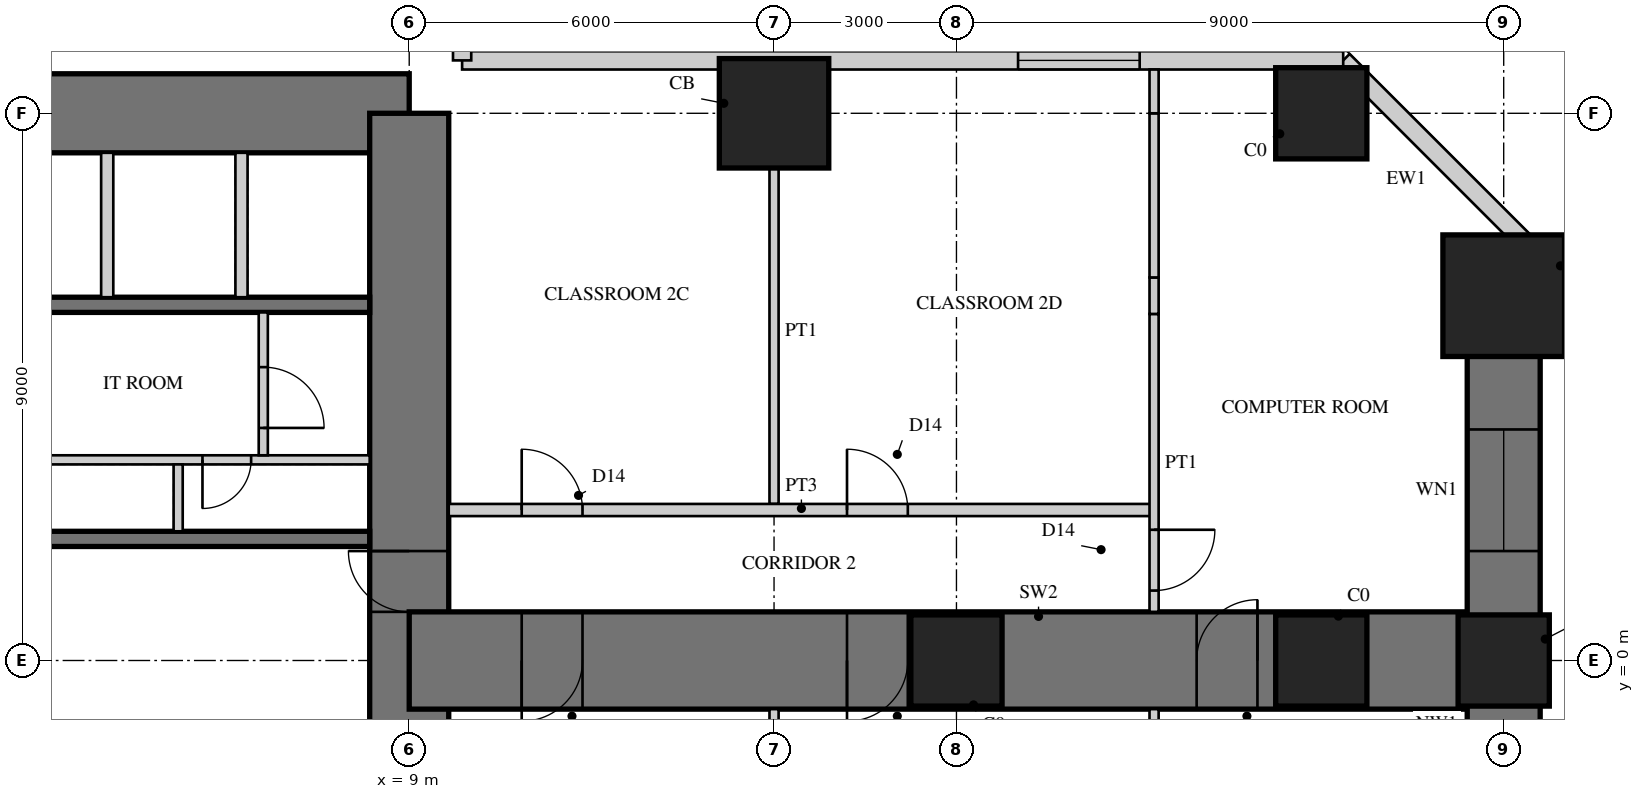
"""IFC4 building model, lengths in metres.
Left out: names, types, materials, properties, quantities, classifications, styles, units other than length and angle.
Written with IfcOpenShell. Run it as: python <this file> out.ifc"""

import sys

from ifc_helpers import new_model, si_unit, direction, frame, frame_2d, origin, origin_2d, place, context, subcontext, project, spatial, rectangle, hollow_rectangle, extrude, element, fill, save


model = new_model("IFC4")
c1 = context("Model", 3, precision=1e-05, world=origin(), true_north=direction((0.0, 1.0)))
c2 = subcontext(c1, "Body", "Model", "MODEL_VIEW")
j1 = project(units=[si_unit("LENGTHUNIT", "METRE"), si_unit("PLANEANGLEUNIT", "RADIAN")], contexts=[c1])
p1 = place(None, origin())
s1 = spatial("IfcSite", under=j1, at=p1, CompositionType="ELEMENT")
p2 = place(p1, origin())
s2 = spatial("IfcBuilding", under=s1, at=p2, CompositionType="ELEMENT")
p3 = place(p2, frame((0.0, 0.0, 9.5)))
s3 = spatial("IfcBuildingStorey", under=s2, at=p3, CompositionType="ELEMENT", Elevation=9.5)
p4 = place(p3, frame((9.0, 9.0, 0.0), z_axis=(0.0, 0.0, 1.0), x_axis=(-1.0, 0.0, 0.0)))
e1 = element("IfcWall", 1, at=p4, inside=s3, PredefinedType="SHEAR", context=c2, shape_type="SweptSolid", body=[
    extrude(rectangle(XDim=18.0, YDim=1.3, at=frame_2d((9.0, 0.0))), origin(), (0.0, 0.0, 1.0), 4.5),
])
p5 = place(p4, frame((9.8, 0.0, 0.0)))
e2 = element("IfcOpeningElement", 2, at=p5, cuts=e1, PredefinedType="OPENING", context=c2, shape_type="SweptSolid", body=[
    extrude(rectangle(XDim=1.0, YDim=2.4, at=frame_2d((0.5, 1.2))), frame((0.0, 0.66, 0.0), z_axis=(0.0, -1.0, 0.0), x_axis=(1.0, 0.0, 0.0)), (0.0, 0.0, 1.0), 1.32),
])
p6 = place(p3, frame((9.0, -9.0, 0.0), z_axis=(0.0, 0.0, 1.0), x_axis=(0.0, 1.0, 0.0)))
e3 = element("IfcWall", 3, at=p6, inside=s3, PredefinedType="SHEAR", context=c2, shape_type="SweptSolid", body=[
    extrude(rectangle(XDim=18.0, YDim=1.3, at=frame_2d((9.0, 0.0))), origin(), (0.0, 0.0, 1.0), 4.5),
])
p7 = place(p6, frame((9.8, 0.0, 0.0)))
e4 = element("IfcOpeningElement", 4, at=p7, cuts=e3, PredefinedType="OPENING", context=c2, shape_type="SweptSolid", body=[
    extrude(rectangle(XDim=1.0, YDim=2.4, at=frame_2d((0.5, 1.2))), frame((0.0, 0.66, 0.0), z_axis=(0.0, -1.0, 0.0), x_axis=(1.0, 0.0, 0.0)), (0.0, 0.0, 1.0), 1.32),
])
for number, where, z_axis, x_axis in (
    (5, (1.925, 2.0, 0.0), (0.0, 0.0, 1.0), (1.0, 0.0, 0.0)),
    (6, (1.925, 5.85, 0.0), (0.0, 0.0, 1.0), (1.0, 0.0, 0.0)),
):
    element("IfcWall", number, at=place(p3, frame(where, z_axis=z_axis, x_axis=x_axis)), inside=s3, PredefinedType="SHEAR", context=c2, shape_type="SweptSolid", body=[
        extrude(rectangle(XDim=6.425, YDim=0.25, at=frame_2d((3.212, 0.0))), origin(), (0.0, 0.0, 1.0), 4.5),
    ])
p8 = place(p3, frame((1.925, 3.3, 0.0), z_axis=(0.0, 0.0, 1.0), x_axis=(1.0, 0.0, 0.0)))
e7 = element("IfcWall", 7, at=p8, inside=s3, PredefinedType="PARTITIONING", context=c2, shape_type="SweptSolid", body=[
    extrude(rectangle(XDim=6.425, YDim=0.15, at=frame_2d((3.212, 0.0))), origin(), (0.0, 0.0, 1.0), 4.5),
])
p9 = place(p8, frame((0.075, 0.0, 0.0)))
e8 = element("IfcOpeningElement", 8, at=p9, cuts=e7, PredefinedType="OPENING", context=c2, shape_type="SweptSolid", body=[
    extrude(rectangle(XDim=0.8, YDim=2.1, at=frame_2d((0.4, 1.05))), frame((0.0, 0.085, 0.0), z_axis=(0.0, -1.0, 0.0), x_axis=(1.0, 0.0, 0.0)), (0.0, 0.0, 1.0), 0.17),
])
p10 = place(p8, frame((3.675, 0.0, 0.0)))
e9 = element("IfcOpeningElement", 9, at=p10, cuts=e7, PredefinedType="OPENING", context=c2, shape_type="SweptSolid", body=[
    extrude(rectangle(XDim=0.8, YDim=2.1, at=frame_2d((0.4, 1.05))), frame((0.0, 0.085, 0.0), z_axis=(0.0, -1.0, 0.0), x_axis=(1.0, 0.0, 0.0)), (0.0, 0.0, 1.0), 0.17),
])
p11 = place(p3, frame((5.2, 2.125, 0.0), z_axis=(0.0, 0.0, 1.0), x_axis=(0.0, 1.0, 0.0)))
e10 = element("IfcWall", 10, at=p11, inside=s3, PredefinedType="PARTITIONING", context=c2, shape_type="SweptSolid", body=[
    extrude(rectangle(XDim=1.1, YDim=0.15, at=frame_2d((0.55, 0.0))), origin(), (0.0, 0.0, 1.0), 4.5),
])
for number, where, z_axis, x_axis in (
    (11, (4.033, 5.975, 0.0), (0.0, 0.0, 1.0), (0.0, 1.0, 0.0)),
    (12, (6.242, 5.975, 0.0), (0.0, 0.0, 1.0), (0.0, 1.0, 0.0)),
):
    element("IfcWall", number, at=place(p3, frame(where, z_axis=z_axis, x_axis=x_axis)), inside=s3, PredefinedType="PARTITIONING", context=c2, shape_type="SweptSolid", body=[
        extrude(rectangle(XDim=2.375, YDim=0.2, at=frame_2d((1.188, 0.0))), origin(), (0.0, 0.0, 1.0), 4.5),
    ])
p12 = place(p3, frame((9.0, 0.0, 0.0), z_axis=(0.0, 0.0, 1.0), x_axis=(1.0, 0.0, 0.0)))
e13 = element("IfcWall", 13, at=p12, inside=s3, PredefinedType="SHEAR", context=c2, shape_type="SweptSolid", body=[
    extrude(rectangle(XDim=18.0, YDim=1.6, at=frame_2d((9.0, 0.0))), origin(), (0.0, 0.0, 1.0), 4.5),
])
p13 = place(p12, frame((1.85, 0.0, 0.0)))
e14 = element("IfcOpeningElement", 14, at=p13, cuts=e13, PredefinedType="OPENING", context=c2, shape_type="SweptSolid", body=[
    extrude(rectangle(XDim=1.0, YDim=2.2, at=frame_2d((0.5, 1.1))), frame((0.0, 0.81, 0.0), z_axis=(0.0, -1.0, 0.0), x_axis=(1.0, 0.0, 0.0)), (0.0, 0.0, 1.0), 1.62),
])
p14 = place(p12, frame((7.2, 0.0, 0.0)))
e15 = element("IfcOpeningElement", 15, at=p14, cuts=e13, PredefinedType="OPENING", context=c2, shape_type="SweptSolid", body=[
    extrude(rectangle(XDim=1.0, YDim=2.2, at=frame_2d((0.5, 1.1))), frame((0.0, 0.81, 0.0), z_axis=(0.0, -1.0, 0.0), x_axis=(1.0, 0.0, 0.0)), (0.0, 0.0, 1.0), 1.62),
])
p15 = place(p12, frame((12.95, 0.0, 0.0)))
e16 = element("IfcOpeningElement", 16, at=p15, cuts=e13, PredefinedType="OPENING", context=c2, shape_type="SweptSolid", body=[
    extrude(rectangle(XDim=1.0, YDim=2.2, at=frame_2d((0.5, 1.1))), frame((0.0, 0.81, 0.0), z_axis=(0.0, -1.0, 0.0), x_axis=(1.0, 0.0, 0.0)), (0.0, 0.0, 1.0), 1.62),
])
p16 = place(p3, frame((27.0, -6.0, 0.0), z_axis=(0.0, 0.0, 1.0), x_axis=(0.0, 1.0, 0.0)))
e17 = element("IfcWall", 17, at=p16, inside=s3, PredefinedType="SHEAR", context=c2, shape_type="SweptSolid", body=[
    extrude(rectangle(XDim=12.0, YDim=1.2, at=frame_2d((6.0, 0.0))), origin(), (0.0, 0.0, 1.0), 4.5),
])
p17 = place(p16, frame((2.2, 0.0, 0.9)))
e18 = element("IfcOpeningElement", 18, at=p17, cuts=e17, PredefinedType="OPENING", context=c2, shape_type="SweptSolid", body=[
    extrude(rectangle(XDim=2.0, YDim=1.8, at=frame_2d((1.0, 0.9))), frame((0.0, 0.61, 0.0), z_axis=(0.0, -1.0, 0.0), x_axis=(1.0, 0.0, 0.0)), (0.0, 0.0, 1.0), 1.22),
])
p18 = place(p16, frame((7.8, 0.0, 0.9)))
e19 = element("IfcOpeningElement", 19, at=p18, cuts=e17, PredefinedType="OPENING", context=c2, shape_type="SweptSolid", body=[
    extrude(rectangle(XDim=2.0, YDim=1.8, at=frame_2d((1.0, 0.9))), frame((0.0, 0.61, 0.0), z_axis=(0.0, -1.0, 0.0), x_axis=(1.0, 0.0, 0.0)), (0.0, 0.0, 1.0), 1.22),
])
p19 = place(p3, frame((15.0, 9.0, 0.0), z_axis=(0.0, 0.0, 1.0), x_axis=(1.0, 0.0, 0.0)))
e20 = element("IfcColumn", 20, at=p19, inside=s3, PredefinedType="COLUMN", context=c2, shape_type="SweptSolid", body=[
    extrude(rectangle(XDim=1.8, YDim=1.8, at=origin_2d()), origin(), (0.0, 0.0, 1.0), 4.5),
])
for number, where, z_axis, x_axis in (
    (21, (24.0, 9.0, 0.0), (0.0, 0.0, 1.0), (1.0, 0.0, 0.0)),
    (22, (27.0, 0.0, 0.0), (0.0, 0.0, 1.0), (1.0, 0.0, 0.0)),
):
    element("IfcColumn", number, at=place(p3, frame(where, z_axis=z_axis, x_axis=x_axis)), inside=s3, PredefinedType="COLUMN", context=c2, shape_type="SweptSolid", body=[
        extrude(rectangle(XDim=1.5, YDim=1.5, at=origin_2d()), origin(), (0.0, 0.0, 1.0), 4.5),
    ])
p20 = place(p3, frame((27.0, 6.0, 0.0), z_axis=(0.0, 0.0, 1.0), x_axis=(1.0, 0.0, 0.0)))
e23 = element("IfcColumn", 23, at=p20, inside=s3, PredefinedType="COLUMN", context=c2, shape_type="SweptSolid", body=[
    extrude(rectangle(XDim=2.0, YDim=2.0, at=origin_2d()), origin(), (0.0, 0.0, 1.0), 4.5),
])
for number, where, z_axis, x_axis in (
    (24, (18.0, 0.0, 0.0), (0.0, 0.0, 1.0), (1.0, 0.0, 0.0)),
    (25, (24.0, 0.0, 0.0), (0.0, 0.0, 1.0), (1.0, 0.0, 0.0)),
):
    element("IfcColumn", number, at=place(p3, frame(where, z_axis=z_axis, x_axis=x_axis)), inside=s3, PredefinedType="COLUMN", context=c2, shape_type="SweptSolid", body=[
        extrude(rectangle(XDim=1.5, YDim=1.5, at=origin_2d()), origin(), (0.0, 0.0, 1.0), 4.5),
    ])
p21 = place(p3, frame((27.6, 6.63, 0.0), z_axis=(0.0, 0.0, 1.0), x_axis=(-0.707106781187, 0.707106781187, 0.0)))
e26 = element("IfcWall", 26, at=p21, inside=s3, PredefinedType="SOLIDWALL", context=c2, shape_type="SweptSolid", body=[
    extrude(rectangle(XDim=4.582, YDim=0.3, at=frame_2d((2.291, 0.0))), origin(), (0.0, 0.0, 1.0), 4.3),
])
p22 = place(p3, frame((24.36, 9.87, 0.0), z_axis=(0.0, 0.0, 1.0), x_axis=(-1.0, 0.0, 0.0)))
e27 = element("IfcWall", 27, at=p22, inside=s3, PredefinedType="SOLIDWALL", context=c2, shape_type="SweptSolid", body=[
    extrude(rectangle(XDim=14.49, YDim=0.3, at=frame_2d((7.245, 0.0))), origin(), (0.0, 0.0, 1.0), 4.3),
])
p23 = place(p22, frame((3.347, 0.0, 0.9)))
e28 = element("IfcOpeningElement", 28, at=p23, cuts=e27, PredefinedType="OPENING", context=c2, shape_type="SweptSolid", body=[
    extrude(rectangle(XDim=2.0, YDim=1.8, at=frame_2d((1.0, 0.9))), frame((0.0, 0.16, 0.0), z_axis=(0.0, -1.0, 0.0), x_axis=(1.0, 0.0, 0.0)), (0.0, 0.0, 1.0), 0.32),
])
p24 = place(p3, frame((9.87, 9.87, 0.0), z_axis=(0.0, 0.0, 1.0), x_axis=(0.0, 1.0, 0.0)))
e29 = element("IfcWall", 29, at=p24, inside=s3, PredefinedType="SOLIDWALL", context=c2, shape_type="SweptSolid", body=[
    extrude(rectangle(XDim=14.49, YDim=0.3, at=frame_2d((7.245, 0.0))), origin(), (0.0, 0.0, 1.0), 4.3),
])
p25 = place(p24, frame((6.245, 0.0, 0.9)))
e30 = element("IfcOpeningElement", 30, at=p25, cuts=e29, PredefinedType="OPENING", context=c2, shape_type="SweptSolid", body=[
    extrude(rectangle(XDim=2.0, YDim=1.8, at=frame_2d((1.0, 0.9))), frame((0.0, 0.16, 0.0), z_axis=(0.0, -1.0, 0.0), x_axis=(1.0, 0.0, 0.0)), (0.0, 0.0, 1.0), 0.32),
])
p26 = place(p24, frame((9.143, 0.0, 0.9)))
e31 = element("IfcOpeningElement", 31, at=p26, cuts=e29, PredefinedType="OPENING", context=c2, shape_type="SweptSolid", body=[
    extrude(rectangle(XDim=2.0, YDim=1.8, at=frame_2d((1.0, 0.9))), frame((0.0, 0.16, 0.0), z_axis=(0.0, -1.0, 0.0), x_axis=(1.0, 0.0, 0.0)), (0.0, 0.0, 1.0), 0.32),
])
p27 = place(p3, frame((6.6, 3.375, 0.0), z_axis=(0.0, 0.0, 1.0), x_axis=(0.0, 1.0, 0.0)))
e32 = element("IfcWall", 32, at=p27, inside=s3, PredefinedType="PARTITIONING", context=c2, shape_type="SweptSolid", body=[
    extrude(rectangle(XDim=2.35, YDim=0.15, at=frame_2d((1.175, 0.0))), origin(), (0.0, 0.0, 1.0), 4.3),
])
p28 = place(p27, frame((0.45, 0.0, 0.0)))
e33 = element("IfcOpeningElement", 33, at=p28, cuts=e32, PredefinedType="OPENING", context=c2, shape_type="SweptSolid", body=[
    extrude(rectangle(XDim=1.0, YDim=2.1, at=frame_2d((0.5, 1.05))), frame((0.0, 0.085, 0.0), z_axis=(0.0, -1.0, 0.0), x_axis=(1.0, 0.0, 0.0)), (0.0, 0.0, 1.0), 0.17),
])
p29 = place(p3, frame((15.0, 2.575, 0.0), z_axis=(0.0, 0.0, 1.0), x_axis=(0.0, 1.0, 0.0)))
e34 = element("IfcWall", 34, at=p29, inside=s3, PredefinedType="PARTITIONING", context=c2, shape_type="SweptSolid", body=[
    extrude(rectangle(XDim=5.675, YDim=0.15, at=frame_2d((2.837, 0.0))), origin(), (0.0, 0.0, 1.0), 3.35),
])
p30 = place(p3, frame((15.0, -8.25, 0.0), z_axis=(0.0, 0.0, 1.0), x_axis=(0.0, 1.0, 0.0)))
e35 = element("IfcWall", 35, at=p30, inside=s3, PredefinedType="PARTITIONING", context=c2, shape_type="SweptSolid", body=[
    extrude(rectangle(XDim=7.45, YDim=0.15, at=frame_2d((3.725, 0.0))), origin(), (0.0, 0.0, 1.0), 3.35),
])
p31 = place(p3, frame((9.65, 2.475, 0.0), z_axis=(0.0, 0.0, 1.0), x_axis=(1.0, 0.0, 0.0)))
e36 = element("IfcWall", 36, at=p31, inside=s3, PredefinedType="SOLIDWALL", context=c2, shape_type="SweptSolid", body=[
    extrude(rectangle(XDim=11.6, YDim=0.2, at=frame_2d((5.8, 0.0))), origin(), (0.0, 0.0, 1.0), 4.3),
])
p32 = place(p31, frame((1.2, 0.0, 0.0)))
e37 = element("IfcOpeningElement", 37, at=p32, cuts=e36, PredefinedType="OPENING", context=c2, shape_type="SweptSolid", body=[
    extrude(rectangle(XDim=1.0, YDim=2.2, at=frame_2d((0.5, 1.1))), frame((0.0, 0.11, 0.0), z_axis=(0.0, -1.0, 0.0), x_axis=(1.0, 0.0, 0.0)), (0.0, 0.0, 1.0), 0.22),
])
p33 = place(p31, frame((6.55, 0.0, 0.0)))
e38 = element("IfcOpeningElement", 38, at=p33, cuts=e36, PredefinedType="OPENING", context=c2, shape_type="SweptSolid", body=[
    extrude(rectangle(XDim=1.0, YDim=2.2, at=frame_2d((0.5, 1.1))), frame((0.0, 0.11, 0.0), z_axis=(0.0, -1.0, 0.0), x_axis=(1.0, 0.0, 0.0)), (0.0, 0.0, 1.0), 0.22),
])
p34 = place(p3, frame((21.25, -5.7, 0.0), z_axis=(0.0, 0.0, 1.0), x_axis=(0.0, 1.0, 0.0)))
e39 = element("IfcWall", 39, at=p34, inside=s3, PredefinedType="PARTITIONING", context=c2, shape_type="SweptSolid", body=[
    extrude(rectangle(XDim=4.9, YDim=0.15, at=frame_2d((2.45, 0.0))), origin(), (0.0, 0.0, 1.0), 3.35),
])
p35 = place(p3, frame((21.25, 0.8, 0.0), z_axis=(0.0, 0.0, 1.0), x_axis=(0.0, 1.0, 0.0)))
e40 = element("IfcWall", 40, at=p35, inside=s3, PredefinedType="PARTITIONING", context=c2, shape_type="SweptSolid", body=[
    extrude(rectangle(XDim=4.9, YDim=0.15, at=frame_2d((2.45, 0.0))), origin(), (0.0, 0.0, 1.0), 3.35),
])
p36 = place(p35, frame((0.35, 0.0, 0.0)))
e41 = element("IfcOpeningElement", 41, at=p36, cuts=e40, PredefinedType="OPENING", context=c2, shape_type="SweptSolid", body=[
    extrude(rectangle(XDim=1.0, YDim=2.2, at=frame_2d((0.5, 1.1))), frame((0.0, 0.085, 0.0), z_axis=(0.0, -1.0, 0.0), x_axis=(1.0, 0.0, 0.0)), (0.0, 0.0, 1.0), 0.17),
])
p37 = place(p3, frame((21.25, 5.7, 0.0), z_axis=(0.0, 0.0, 1.0), x_axis=(0.0, 1.0, 0.0)))
e42 = element("IfcWall", 42, at=p37, inside=s3, PredefinedType="PARTITIONING", context=c2, shape_type="SweptSolid", body=[
    extrude(rectangle(XDim=0.6, YDim=0.15, at=frame_2d((0.3, 0.0))), origin(), (0.0, 0.0, 1.0), 4.3),
])
p38 = place(p3, frame((21.25, 6.3, 0.0), z_axis=(0.0, 0.0, 1.0), x_axis=(0.0, 1.0, 0.0)))
e43 = element("IfcWall", 43, at=p38, inside=s3, PredefinedType="PARTITIONING", context=c2, shape_type="SweptSolid", body=[
    extrude(rectangle(XDim=2.7, YDim=0.15, at=frame_2d((1.35, 0.0))), origin(), (0.0, 0.0, 1.0), 3.35),
])
p39 = place(p3, frame((21.25, 9.0, 0.0), z_axis=(0.0, 0.0, 1.0), x_axis=(0.0, 1.0, 0.0)))
e44 = element("IfcWall", 44, at=p39, inside=s3, PredefinedType="PARTITIONING", context=c2, shape_type="SweptSolid", body=[
    extrude(rectangle(XDim=0.72, YDim=0.15, at=frame_2d((0.36, 0.0))), origin(), (0.0, 0.0, 1.0), 4.3),
])
p40 = place(p18, origin())
e45 = element("IfcWindow", 45, at=p40, inside=s3, PartitioningType="SINGLE_PANEL", PredefinedType="WINDOW", context=c2, shape_type="SweptSolid", body=[
    extrude(hollow_rectangle(XDim=2.0, YDim=1.8, WallThickness=0.06, at=frame_2d((1.0, 0.9))), frame((0.0, 0.03, 0.0), z_axis=(0.0, -1.0, 0.0), x_axis=(1.0, 0.0, 0.0)), (0.0, 0.0, 1.0), 0.06),
    extrude(rectangle(XDim=1.879, YDim=1.679, at=frame_2d((1.0, 0.9))), frame((0.0, 0.03, 0.0), z_axis=(0.0, -1.0, 0.0), x_axis=(1.0, 0.0, 0.0)), (0.0, 0.0, 1.0), 0.06),
])
fill(e19, e45)
p41 = place(p23, origin())
e46 = element("IfcWindow", 46, at=p41, inside=s3, PartitioningType="SINGLE_PANEL", PredefinedType="WINDOW", context=c2, shape_type="SweptSolid", body=[
    extrude(hollow_rectangle(XDim=2.0, YDim=1.8, WallThickness=0.06, at=frame_2d((1.0, 0.9))), frame((0.0, 0.03, 0.0), z_axis=(0.0, -1.0, 0.0), x_axis=(1.0, 0.0, 0.0)), (0.0, 0.0, 1.0), 0.06),
    extrude(rectangle(XDim=1.879, YDim=1.679, at=frame_2d((1.0, 0.9))), frame((0.0, 0.03, 0.0), z_axis=(0.0, -1.0, 0.0), x_axis=(1.0, 0.0, 0.0)), (0.0, 0.0, 1.0), 0.06),
])
fill(e28, e46)
p42 = place(p28, frame((1.0, 0.0, 0.0), z_axis=(0.0, 0.0, 1.0), x_axis=(-1.0, 0.0, 0.0)))
e47 = element("IfcDoor", 47, at=p42, inside=s3, OperationType="SINGLE_SWING_RIGHT", PredefinedType="DOOR", context=c2, shape_type="SweptSolid", body=[
    extrude(rectangle(XDim=1.0, YDim=2.1, at=frame_2d((0.5, 1.05))), frame((0.0, 0.025, 0.0), z_axis=(0.0, -1.0, 0.0), x_axis=(1.0, 0.0, 0.0)), (0.0, 0.0, 1.0), 0.05),
])
fill(e33, e47)
p43 = place(p32, origin())
e48 = element("IfcDoor", 48, at=p43, inside=s3, OperationType="SINGLE_SWING_LEFT", PredefinedType="DOOR", context=c2, shape_type="SweptSolid", body=[
    extrude(rectangle(XDim=1.0, YDim=2.2, at=frame_2d((0.5, 1.1))), frame((0.0, 0.025, 0.0), z_axis=(0.0, -1.0, 0.0), x_axis=(1.0, 0.0, 0.0)), (0.0, 0.0, 1.0), 0.05),
])
fill(e37, e48)
p44 = place(p33, origin())
e49 = element("IfcDoor", 49, at=p44, inside=s3, OperationType="SINGLE_SWING_LEFT", PredefinedType="DOOR", context=c2, shape_type="SweptSolid", body=[
    extrude(rectangle(XDim=1.0, YDim=2.2, at=frame_2d((0.5, 1.1))), frame((0.0, 0.025, 0.0), z_axis=(0.0, -1.0, 0.0), x_axis=(1.0, 0.0, 0.0)), (0.0, 0.0, 1.0), 0.05),
])
fill(e38, e49)
p45 = place(p36, frame((1.0, 0.0, 0.0), z_axis=(0.0, 0.0, 1.0), x_axis=(-1.0, 0.0, 0.0)))
e50 = element("IfcDoor", 50, at=p45, inside=s3, OperationType="SINGLE_SWING_LEFT", PredefinedType="DOOR", context=c2, shape_type="SweptSolid", body=[
    extrude(rectangle(XDim=1.0, YDim=2.2, at=frame_2d((0.5, 1.1))), frame((0.0, 0.025, 0.0), z_axis=(0.0, -1.0, 0.0), x_axis=(1.0, 0.0, 0.0)), (0.0, 0.0, 1.0), 0.05),
])
fill(e41, e50)
p46 = place(p13, frame((1.0, 0.0, 0.0), z_axis=(0.0, 0.0, 1.0), x_axis=(-1.0, 0.0, 0.0)))
e51 = element("IfcDoor", 51, at=p46, inside=s3, OperationType="SINGLE_SWING_RIGHT", PredefinedType="DOOR", context=c2, shape_type="SweptSolid", body=[
    extrude(rectangle(XDim=1.0, YDim=2.2, at=frame_2d((0.5, 1.1))), frame((0.0, 0.025, 0.0), z_axis=(0.0, -1.0, 0.0), x_axis=(1.0, 0.0, 0.0)), (0.0, 0.0, 1.0), 0.05),
])
fill(e14, e51)
p47 = place(p14, frame((1.0, 0.0, 0.0), z_axis=(0.0, 0.0, 1.0), x_axis=(-1.0, 0.0, 0.0)))
e52 = element("IfcDoor", 52, at=p47, inside=s3, OperationType="SINGLE_SWING_RIGHT", PredefinedType="DOOR", context=c2, shape_type="SweptSolid", body=[
    extrude(rectangle(XDim=1.0, YDim=2.2, at=frame_2d((0.5, 1.1))), frame((0.0, 0.025, 0.0), z_axis=(0.0, -1.0, 0.0), x_axis=(1.0, 0.0, 0.0)), (0.0, 0.0, 1.0), 0.05),
])
fill(e15, e52)
p48 = place(p15, origin())
e53 = element("IfcDoor", 53, at=p48, inside=s3, OperationType="SINGLE_SWING_RIGHT", PredefinedType="DOOR", context=c2, shape_type="SweptSolid", body=[
    extrude(rectangle(XDim=1.0, YDim=2.2, at=frame_2d((0.5, 1.1))), frame((0.0, 0.025, 0.0), z_axis=(0.0, -1.0, 0.0), x_axis=(1.0, 0.0, 0.0)), (0.0, 0.0, 1.0), 0.05),
])
fill(e16, e53)
p49 = place(p7, origin())
e54 = element("IfcDoor", 54, at=p49, inside=s3, OperationType="SINGLE_SWING_RIGHT", PredefinedType="DOOR", context=c2, shape_type="SweptSolid", body=[
    extrude(rectangle(XDim=1.0, YDim=2.4, at=frame_2d((0.5, 1.2))), frame((0.0, 0.055, 0.0), z_axis=(0.0, -1.0, 0.0), x_axis=(1.0, 0.0, 0.0)), (0.0, 0.0, 1.0), 0.05),
])
fill(e4, e54)
p50 = place(p10, frame((0.8, 0.0, 0.0), z_axis=(0.0, 0.0, 1.0), x_axis=(-1.0, 0.0, 0.0)))
e55 = element("IfcDoor", 55, at=p50, inside=s3, OperationType="SINGLE_SWING_RIGHT", PredefinedType="DOOR", context=c2, shape_type="SweptSolid", body=[
    extrude(rectangle(XDim=0.8, YDim=2.1, at=frame_2d((0.4, 1.05))), frame((0.0, 0.025, 0.0), z_axis=(0.0, -1.0, 0.0), x_axis=(1.0, 0.0, 0.0)), (0.0, 0.0, 1.0), 0.05),
])
fill(e9, e55)
save(model, sys.argv[1])
